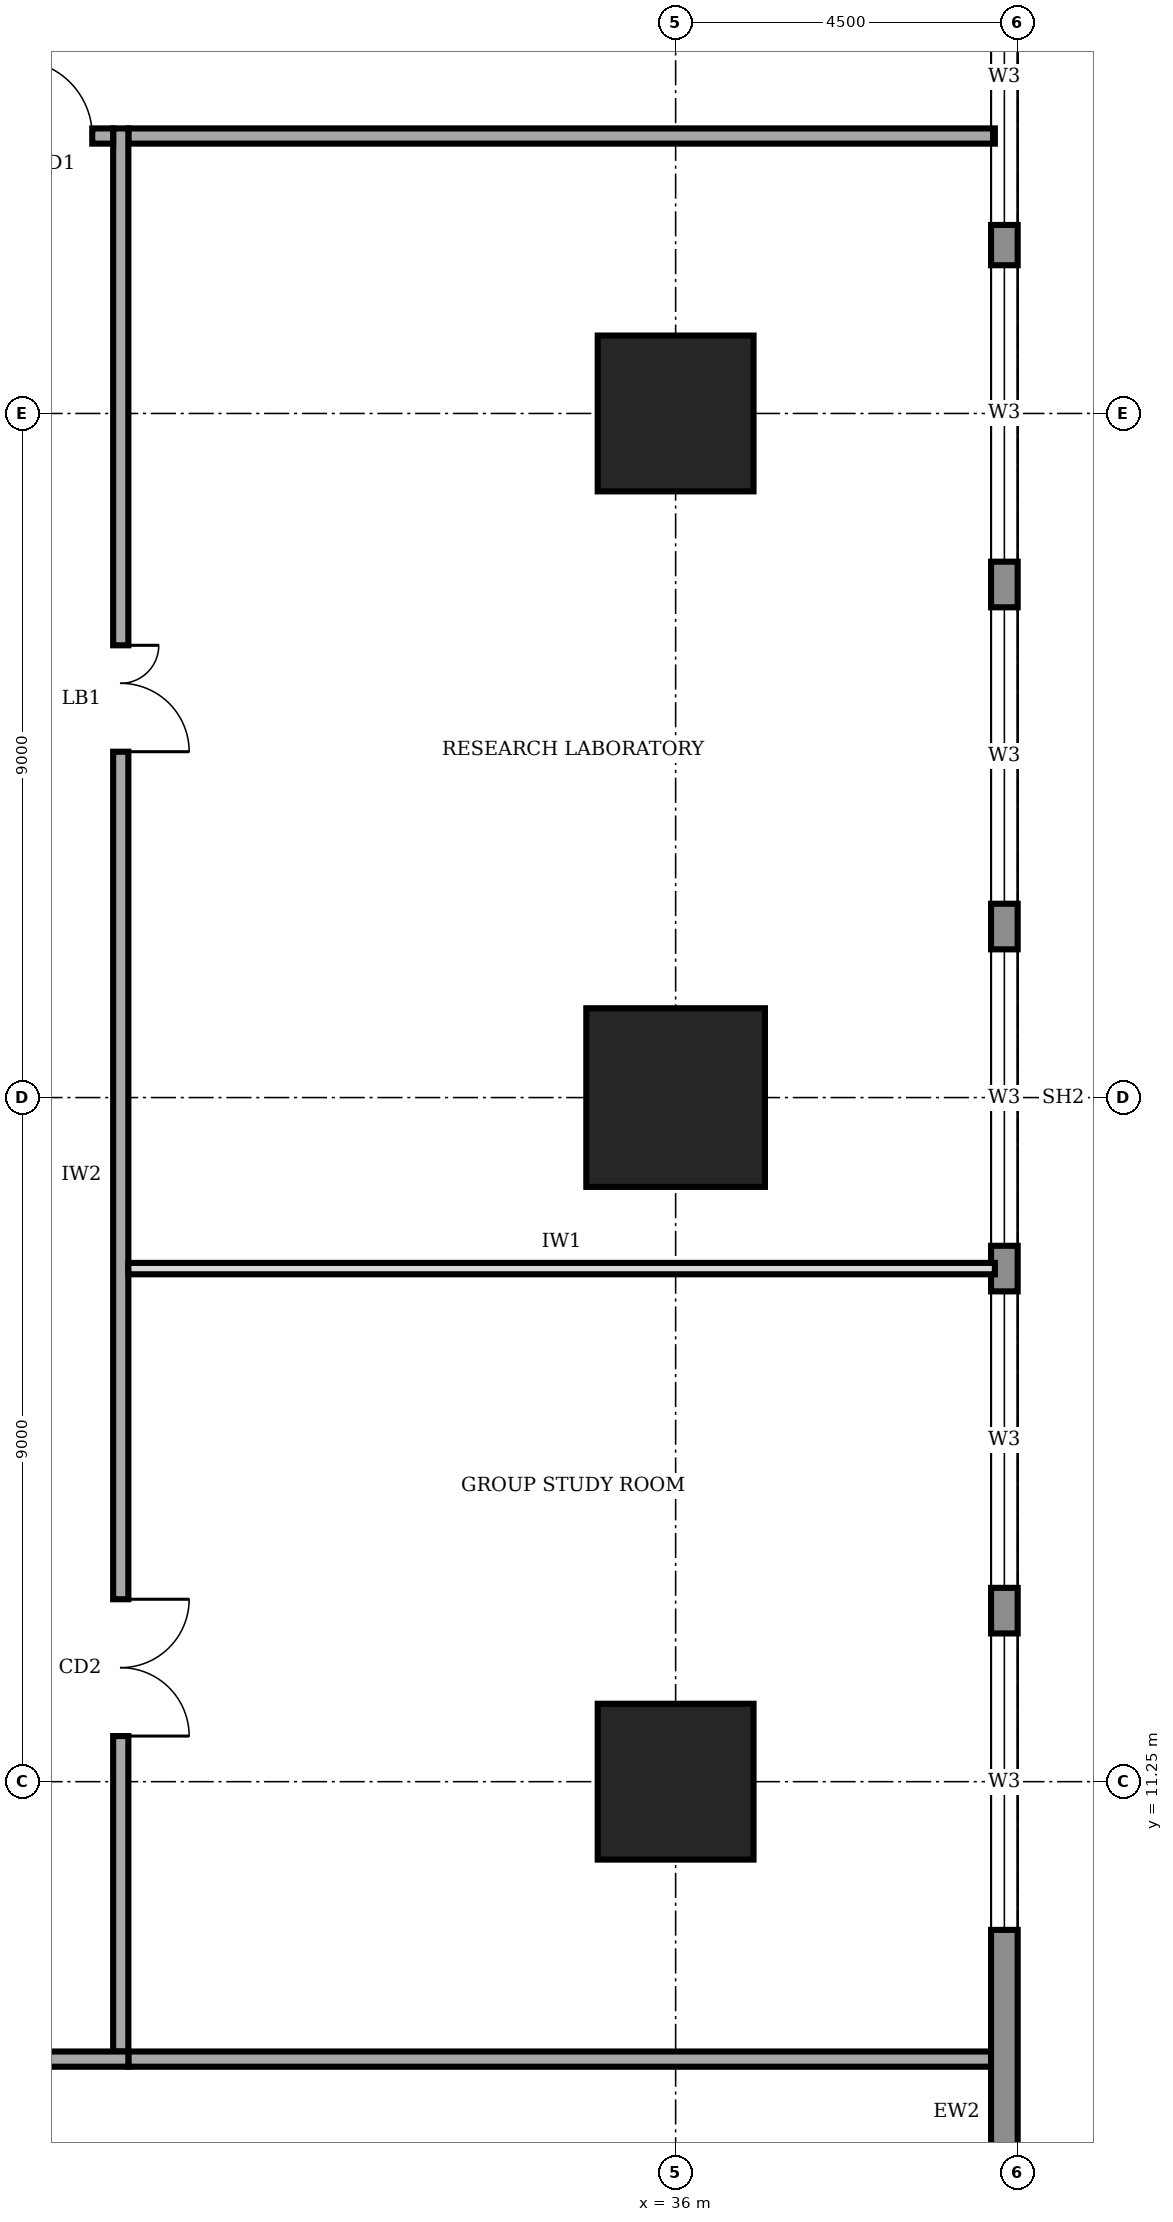
"""IFC4 building model, lengths in metres.
Left out: names, types, materials, properties, quantities, classifications, styles, units other than length and angle.
Written with IfcOpenShell. Run it as: python <this file> out.ifc"""

import sys

from ifc_helpers import new_model, si_unit, direction, frame, frame_2d, origin, origin_2d, place, context, subcontext, project, spatial, rectangle, extrude, element, fill, save


model = new_model("IFC4")
c1 = context("Model", 3, precision=1e-05, world=origin(), true_north=direction((0.0, 1.0)))
c2 = subcontext(c1, "Body", "Model", "MODEL_VIEW")
j1 = project(units=[si_unit("LENGTHUNIT", "METRE"), si_unit("PLANEANGLEUNIT", "RADIAN")], contexts=[c1])
p1 = place(None, origin())
s1 = spatial("IfcSite", under=j1, at=p1, CompositionType="ELEMENT")
p2 = place(p1, origin())
s2 = spatial("IfcBuilding", under=s1, at=p2, CompositionType="ELEMENT")
p3 = place(p2, frame((0.0, 0.0, 197.0)))
s3 = spatial("IfcBuildingStorey", under=s2, at=p3, CompositionType="ELEMENT", Elevation=197.0)
p4 = place(p3, frame((36.0, 11.25, 0.0), z_axis=(0.0, 0.0, 1.0), x_axis=(1.0, 0.0, 0.0)))
e1 = element("IfcColumn", 1, at=p4, inside=s3, PredefinedType="COLUMN", context=c2, shape_type="SweptSolid", body=[
    extrude(rectangle(XDim=2.05, YDim=2.05, at=origin_2d()), origin(), (0.0, 0.0, 1.0), 4.0),
])
p5 = place(p3, frame((36.0, 20.25, 0.0), z_axis=(0.0, 0.0, 1.0), x_axis=(1.0, 0.0, 0.0)))
e2 = element("IfcColumn", 2, at=p5, inside=s3, PredefinedType="COLUMN", context=c2, shape_type="SweptSolid", body=[
    extrude(rectangle(XDim=2.35, YDim=2.35, at=origin_2d()), origin(), (0.0, 0.0, 1.0), 4.0),
])
p6 = place(p3, frame((36.0, 29.25, 0.0), z_axis=(0.0, 0.0, 1.0), x_axis=(1.0, 0.0, 0.0)))
e3 = element("IfcColumn", 3, at=p6, inside=s3, PredefinedType="COLUMN", context=c2, shape_type="SweptSolid", body=[
    extrude(rectangle(XDim=2.05, YDim=2.05, at=origin_2d()), origin(), (0.0, 0.0, 1.0), 4.0),
])
p7 = place(p3, frame((40.325, 4.52, 0.0), z_axis=(0.0, 0.0, 1.0), x_axis=(0.0, 1.0, 0.0)))
e4 = element("IfcWall", 4, at=p7, inside=s3, PredefinedType="STANDARD", context=c2, shape_type="SweptSolid", body=[
    extrude(rectangle(XDim=31.46, YDim=0.35, at=frame_2d((15.73, 0.0))), origin(), (0.0, 0.0, 1.0), 3.75),
])
p8 = place(p7, frame((4.78, 0.0, 0.95)))
e5 = element("IfcOpeningElement", 5, at=p8, cuts=e4, PredefinedType="OPENING", context=c2, shape_type="SweptSolid", body=[
    extrude(rectangle(XDim=3.9, YDim=1.8, at=frame_2d((1.95, 0.9))), frame((0.0, 0.185, 0.0), z_axis=(0.0, -1.0, 0.0), x_axis=(1.0, 0.0, 0.0)), (0.0, 0.0, 1.0), 0.37),
])
p9 = place(p7, frame((9.28, 0.0, 0.95)))
e6 = element("IfcOpeningElement", 6, at=p9, cuts=e4, PredefinedType="OPENING", context=c2, shape_type="SweptSolid", body=[
    extrude(rectangle(XDim=3.9, YDim=1.8, at=frame_2d((1.95, 0.9))), frame((0.0, 0.185, 0.0), z_axis=(0.0, -1.0, 0.0), x_axis=(1.0, 0.0, 0.0)), (0.0, 0.0, 1.0), 0.37),
])
p10 = place(p7, frame((13.78, 0.0, 0.95)))
e7 = element("IfcOpeningElement", 7, at=p10, cuts=e4, PredefinedType="OPENING", context=c2, shape_type="SweptSolid", body=[
    extrude(rectangle(XDim=3.9, YDim=1.8, at=frame_2d((1.95, 0.9))), frame((0.0, 0.185, 0.0), z_axis=(0.0, -1.0, 0.0), x_axis=(1.0, 0.0, 0.0)), (0.0, 0.0, 1.0), 0.37),
])
p11 = place(p7, frame((18.28, 0.0, 0.95)))
e8 = element("IfcOpeningElement", 8, at=p11, cuts=e4, PredefinedType="OPENING", context=c2, shape_type="SweptSolid", body=[
    extrude(rectangle(XDim=3.9, YDim=1.8, at=frame_2d((1.95, 0.9))), frame((0.0, 0.185, 0.0), z_axis=(0.0, -1.0, 0.0), x_axis=(1.0, 0.0, 0.0)), (0.0, 0.0, 1.0), 0.37),
])
p12 = place(p7, frame((22.78, 0.0, 0.95)))
e9 = element("IfcOpeningElement", 9, at=p12, cuts=e4, PredefinedType="OPENING", context=c2, shape_type="SweptSolid", body=[
    extrude(rectangle(XDim=3.9, YDim=1.8, at=frame_2d((1.95, 0.9))), frame((0.0, 0.185, 0.0), z_axis=(0.0, -1.0, 0.0), x_axis=(1.0, 0.0, 0.0)), (0.0, 0.0, 1.0), 0.37),
])
p13 = place(p7, frame((27.21, 0.0, 0.95)))
e10 = element("IfcOpeningElement", 10, at=p13, cuts=e4, PredefinedType="OPENING", context=c2, shape_type="SweptSolid", body=[
    extrude(rectangle(XDim=3.9, YDim=1.8, at=frame_2d((1.95, 0.9))), frame((0.0, 0.185, 0.0), z_axis=(0.0, -1.0, 0.0), x_axis=(1.0, 0.0, 0.0)), (0.0, 0.0, 1.0), 0.37),
])
p14 = place(p3, frame((11.9, 7.6, 0.0), z_axis=(0.0, 0.0, 1.0), x_axis=(1.0, 0.0, 0.0)))
e11 = element("IfcWall", 11, at=p14, inside=s3, PredefinedType="SOLIDWALL", context=c2, shape_type="SweptSolid", body=[
    extrude(rectangle(XDim=16.9, YDim=0.2, at=frame_2d((8.45, 0.0))), origin(), (0.0, 0.0, 1.0), 3.75),
])
p15 = place(p14, frame((2.05, 0.0, 0.0)))
e12 = element("IfcOpeningElement", 12, at=p15, cuts=e11, PredefinedType="OPENING", context=c2, shape_type="SweptSolid", body=[
    extrude(rectangle(XDim=1.8, YDim=2.1, at=frame_2d((0.9, 1.05))), frame((0.0, 0.11, 0.0), z_axis=(0.0, -1.0, 0.0), x_axis=(1.0, 0.0, 0.0)), (0.0, 0.0, 1.0), 0.22),
])
p16 = place(p14, frame((7.85, 0.0, 0.0)))
e13 = element("IfcOpeningElement", 13, at=p16, cuts=e11, PredefinedType="OPENING", context=c2, shape_type="SweptSolid", body=[
    extrude(rectangle(XDim=1.0, YDim=2.1, at=frame_2d((0.5, 1.05))), frame((0.0, 0.11, 0.0), z_axis=(0.0, -1.0, 0.0), x_axis=(1.0, 0.0, 0.0)), (0.0, 0.0, 1.0), 0.22),
])
p17 = place(p14, frame((12.85, 0.0, 0.0)))
e14 = element("IfcOpeningElement", 14, at=p17, cuts=e11, PredefinedType="OPENING", context=c2, shape_type="SweptSolid", body=[
    extrude(rectangle(XDim=1.8, YDim=2.1, at=frame_2d((0.9, 1.05))), frame((0.0, 0.11, 0.0), z_axis=(0.0, -1.0, 0.0), x_axis=(1.0, 0.0, 0.0)), (0.0, 0.0, 1.0), 0.22),
])
p18 = place(p3, frame((28.7, 7.7, 0.0), z_axis=(0.0, 0.0, 1.0), x_axis=(0.0, 1.0, 0.0)))
e15 = element("IfcWall", 15, at=p18, inside=s3, PredefinedType="SOLIDWALL", context=c2, shape_type="SweptSolid", body=[
    extrude(rectangle(XDim=25.3, YDim=0.2, at=frame_2d((12.65, 0.0))), origin(), (0.0, 0.0, 1.0), 3.75),
])
p19 = place(p18, frame((4.15, 0.0, 0.0)))
e16 = element("IfcOpeningElement", 16, at=p19, cuts=e15, PredefinedType="OPENING", context=c2, shape_type="SweptSolid", body=[
    extrude(rectangle(XDim=1.8, YDim=2.1, at=frame_2d((0.9, 1.05))), frame((0.0, 0.11, 0.0), z_axis=(0.0, -1.0, 0.0), x_axis=(1.0, 0.0, 0.0)), (0.0, 0.0, 1.0), 0.22),
])
p20 = place(p18, frame((17.1, 0.0, 0.0)))
e17 = element("IfcOpeningElement", 17, at=p20, cuts=e15, PredefinedType="OPENING", context=c2, shape_type="SweptSolid", body=[
    extrude(rectangle(XDim=1.4, YDim=2.1, at=frame_2d((0.7, 1.05))), frame((0.0, 0.11, 0.0), z_axis=(0.0, -1.0, 0.0), x_axis=(1.0, 0.0, 0.0)), (0.0, 0.0, 1.0), 0.22),
])
p21 = place(p3, frame((28.6, 32.9, 0.0), z_axis=(0.0, 0.0, 1.0), x_axis=(-1.0, 0.0, 0.0)))
e18 = element("IfcWall", 18, at=p21, inside=s3, PredefinedType="SOLIDWALL", context=c2, shape_type="SweptSolid", body=[
    extrude(rectangle(XDim=16.9, YDim=0.2, at=frame_2d((8.45, 0.0))), origin(), (0.0, 0.0, 1.0), 3.75),
])
p22 = place(p21, frame((15.425, 0.0, 0.0)))
e19 = element("IfcOpeningElement", 19, at=p22, cuts=e18, PredefinedType="OPENING", context=c2, shape_type="SweptSolid", body=[
    extrude(rectangle(XDim=1.0, YDim=2.1, at=frame_2d((0.5, 1.05))), frame((0.0, 0.11, 0.0), z_axis=(0.0, -1.0, 0.0), x_axis=(1.0, 0.0, 0.0)), (0.0, 0.0, 1.0), 0.22),
])
p23 = place(p21, frame((12.35, 0.0, 0.0)))
e20 = element("IfcOpeningElement", 20, at=p23, cuts=e18, PredefinedType="OPENING", context=c2, shape_type="SweptSolid", body=[
    extrude(rectangle(XDim=1.0, YDim=2.1, at=frame_2d((0.5, 1.05))), frame((0.0, 0.11, 0.0), z_axis=(0.0, -1.0, 0.0), x_axis=(1.0, 0.0, 0.0)), (0.0, 0.0, 1.0), 0.22),
])
p24 = place(p21, frame((5.6, 0.0, 0.0)))
e21 = element("IfcOpeningElement", 21, at=p24, cuts=e18, PredefinedType="OPENING", context=c2, shape_type="SweptSolid", body=[
    extrude(rectangle(XDim=1.0, YDim=2.1, at=frame_2d((0.5, 1.05))), frame((0.0, 0.11, 0.0), z_axis=(0.0, -1.0, 0.0), x_axis=(1.0, 0.0, 0.0)), (0.0, 0.0, 1.0), 0.22),
])
p25 = place(p21, frame((0.275, 0.0, 0.0)))
e22 = element("IfcOpeningElement", 22, at=p25, cuts=e18, PredefinedType="OPENING", context=c2, shape_type="SweptSolid", body=[
    extrude(rectangle(XDim=1.0, YDim=2.1, at=frame_2d((0.5, 1.05))), frame((0.0, 0.11, 0.0), z_axis=(0.0, -1.0, 0.0), x_axis=(1.0, 0.0, 0.0)), (0.0, 0.0, 1.0), 0.22),
])
for number, where, z_axis, x_axis in (
    (23, (28.8, 7.6, 0.0), (0.0, 0.0, 1.0), (1.0, 0.0, 0.0)),
    (24, (28.8, 32.9, 0.0), (0.0, 0.0, 1.0), (1.0, 0.0, 0.0)),
):
    element("IfcWall", number, at=place(p3, frame(where, z_axis=z_axis, x_axis=x_axis)), inside=s3, PredefinedType="SOLIDWALL", context=c2, shape_type="SweptSolid", body=[
        extrude(rectangle(XDim=11.4, YDim=0.2, at=frame_2d((5.7, 0.0))), origin(), (0.0, 0.0, 1.0), 3.75),
    ])
p26 = place(p3, frame((28.8, 18.0, 0.0), z_axis=(0.0, 0.0, 1.0), x_axis=(1.0, 0.0, 0.0)))
e25 = element("IfcWall", 25, at=p26, inside=s3, PredefinedType="PARTITIONING", context=c2, shape_type="SweptSolid", body=[
    extrude(rectangle(XDim=11.4, YDim=0.15, at=frame_2d((5.7, 0.0))), origin(), (0.0, 0.0, 1.0), 3.75),
])
p27 = place(p8, origin())
e26 = element("IfcWindow", 26, at=p27, inside=s3, PartitioningType="SINGLE_PANEL", PredefinedType="WINDOW", context=c2, shape_type="SweptSolid", body=[
    extrude(rectangle(XDim=3.9, YDim=1.8, at=frame_2d((1.95, 0.9))), frame((0.0, 0.03, 0.0), z_axis=(0.0, -1.0, 0.0), x_axis=(1.0, 0.0, 0.0)), (0.0, 0.0, 1.0), 0.06),
])
fill(e5, e26)
p28 = place(p9, origin())
e27 = element("IfcWindow", 27, at=p28, inside=s3, PartitioningType="SINGLE_PANEL", PredefinedType="WINDOW", context=c2, shape_type="SweptSolid", body=[
    extrude(rectangle(XDim=3.9, YDim=1.8, at=frame_2d((1.95, 0.9))), frame((0.0, 0.03, 0.0), z_axis=(0.0, -1.0, 0.0), x_axis=(1.0, 0.0, 0.0)), (0.0, 0.0, 1.0), 0.06),
])
fill(e6, e27)
p29 = place(p10, origin())
e28 = element("IfcWindow", 28, at=p29, inside=s3, PartitioningType="SINGLE_PANEL", PredefinedType="WINDOW", context=c2, shape_type="SweptSolid", body=[
    extrude(rectangle(XDim=3.9, YDim=1.8, at=frame_2d((1.95, 0.9))), frame((0.0, 0.03, 0.0), z_axis=(0.0, -1.0, 0.0), x_axis=(1.0, 0.0, 0.0)), (0.0, 0.0, 1.0), 0.06),
])
fill(e7, e28)
p30 = place(p11, origin())
e29 = element("IfcWindow", 29, at=p30, inside=s3, PartitioningType="SINGLE_PANEL", PredefinedType="WINDOW", context=c2, shape_type="SweptSolid", body=[
    extrude(rectangle(XDim=3.9, YDim=1.8, at=frame_2d((1.95, 0.9))), frame((0.0, 0.03, 0.0), z_axis=(0.0, -1.0, 0.0), x_axis=(1.0, 0.0, 0.0)), (0.0, 0.0, 1.0), 0.06),
])
fill(e8, e29)
p31 = place(p12, origin())
e30 = element("IfcWindow", 30, at=p31, inside=s3, PartitioningType="SINGLE_PANEL", PredefinedType="WINDOW", context=c2, shape_type="SweptSolid", body=[
    extrude(rectangle(XDim=3.9, YDim=1.8, at=frame_2d((1.95, 0.9))), frame((0.0, 0.03, 0.0), z_axis=(0.0, -1.0, 0.0), x_axis=(1.0, 0.0, 0.0)), (0.0, 0.0, 1.0), 0.06),
])
fill(e9, e30)
p32 = place(p13, origin())
e31 = element("IfcWindow", 31, at=p32, inside=s3, PartitioningType="SINGLE_PANEL", PredefinedType="WINDOW", context=c2, shape_type="SweptSolid", body=[
    extrude(rectangle(XDim=3.9, YDim=1.8, at=frame_2d((1.95, 0.9))), frame((0.0, 0.03, 0.0), z_axis=(0.0, -1.0, 0.0), x_axis=(1.0, 0.0, 0.0)), (0.0, 0.0, 1.0), 0.06),
])
fill(e10, e31)
p33 = place(p19, frame((1.8, 0.0, 0.0), z_axis=(0.0, 0.0, 1.0), x_axis=(-1.0, 0.0, 0.0)))
e32 = element("IfcDoor", 32, at=p33, inside=s3, OperationType="DOUBLE_DOOR_SINGLE_SWING", PredefinedType="DOOR", context=c2, shape_type="SweptSolid", body=[
    extrude(rectangle(XDim=1.8, YDim=2.1, at=frame_2d((0.9, 1.05))), frame((0.0, 0.025, 0.0), z_axis=(0.0, -1.0, 0.0), x_axis=(1.0, 0.0, 0.0)), (0.0, 0.0, 1.0), 0.05),
])
fill(e16, e32)
p34 = place(p20, frame((1.4, 0.0, 0.0), z_axis=(0.0, 0.0, 1.0), x_axis=(-1.0, 0.0, 0.0)))
e33 = element("IfcDoor", 33, at=p34, inside=s3, OperationType="DOUBLE_DOOR_SINGLE_SWING", PredefinedType="DOOR", context=c2, shape_type="SweptSolid", body=[
    extrude(rectangle(XDim=1.4, YDim=2.1, at=frame_2d((0.7, 1.05))), frame((0.0, 0.025, 0.0), z_axis=(0.0, -1.0, 0.0), x_axis=(1.0, 0.0, 0.0)), (0.0, 0.0, 1.0), 0.05),
])
fill(e17, e33)
p35 = place(p25, frame((1.0, 0.0, 0.0), z_axis=(0.0, 0.0, 1.0), x_axis=(-1.0, 0.0, 0.0)))
e34 = element("IfcDoor", 34, at=p35, inside=s3, OperationType="SINGLE_SWING_LEFT", PredefinedType="DOOR", context=c2, shape_type="SweptSolid", body=[
    extrude(rectangle(XDim=1.0, YDim=2.1, at=frame_2d((0.5, 1.05))), frame((0.0, 0.025, 0.0), z_axis=(0.0, -1.0, 0.0), x_axis=(1.0, 0.0, 0.0)), (0.0, 0.0, 1.0), 0.05),
])
fill(e22, e34)
save(model, sys.argv[1])
